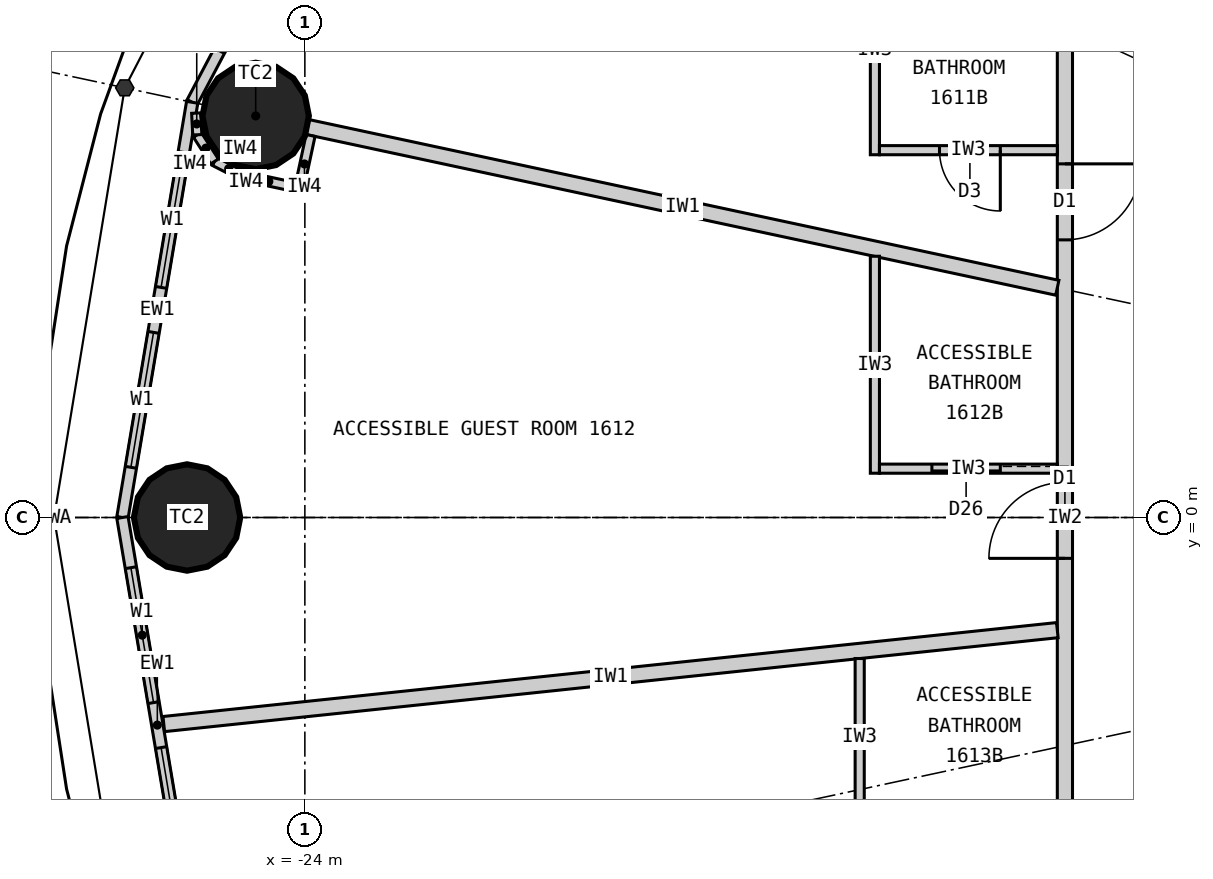
"""IFC4 building model, lengths in metres.
Left out: names, types, materials, properties, quantities, classifications, styles, units other than length and angle.
Written with IfcOpenShell. Run it as: python <this file> out.ifc"""

import sys

from ifc_helpers import new_model, si_unit, direction, frame, frame_2d, origin, origin_2d, place, context, subcontext, project, spatial, rectangle, circle, extrude, element, fill, save


model = new_model("IFC4")
c1 = context("Model", 3, precision=1e-05, world=origin(), true_north=direction((0.0, 1.0)))
c2 = subcontext(c1, "Body", "Model", "MODEL_VIEW")
j1 = project(units=[si_unit("LENGTHUNIT", "METRE"), si_unit("PLANEANGLEUNIT", "RADIAN")], contexts=[c1])
p1 = place(None, origin())
s1 = spatial("IfcSite", under=j1, at=p1, CompositionType="ELEMENT")
p2 = place(p1, origin())
s2 = spatial("IfcBuilding", under=s1, at=p2, CompositionType="ELEMENT")
p3 = place(p2, frame((0.0, 0.0, 67.2)))
s3 = spatial("IfcBuildingStorey", under=s2, at=p3, CompositionType="ELEMENT", Elevation=67.2)
for number, where, z_axis, x_axis in (
    (1, (-24.647, 5.283, 0.0), (0.0, 0.0, 1.0), (1.0, 0.0, 0.0)),
    (2, (-25.55, 0.0, 0.0), (0.0, 0.0, 1.0), (1.0, 0.0, 0.0)),
):
    element("IfcColumn", number, at=place(p3, frame(where, z_axis=z_axis, x_axis=x_axis)), inside=s3, PredefinedType="COLUMN", context=c2, shape_type="SweptSolid", body=[
        extrude(circle(Radius=0.7, at=origin_2d()), origin(), (0.0, 0.0, 1.0), 3.3),
    ])
p4 = place(p3, frame((-22.803, 10.532, 0.0), z_axis=(0.0, 0.0, 1.0), x_axis=(-0.467296867008, -0.884100468321, 0.0)))
e3 = element("IfcWall", 3, at=p4, inside=s3, PredefinedType="ELEMENTEDWALL", context=c2, shape_type="SweptSolid", body=[
    extrude(rectangle(XDim=5.734, YDim=0.15, at=frame_2d((2.867, 0.0))), origin(), (0.0, 0.0, 1.0), 3.12),
])
p5 = place(p4, frame((0.767, 0.0, 0.9)))
e4 = element("IfcOpeningElement", 4, at=p5, cuts=e3, PredefinedType="OPENING", context=c2, shape_type="SweptSolid", body=[
    extrude(rectangle(XDim=1.8, YDim=1.9, at=frame_2d((0.9, 0.95))), frame((0.0, 0.085, 0.0), z_axis=(0.0, -1.0, 0.0), x_axis=(1.0, 0.0, 0.0)), (0.0, 0.0, 1.0), 0.17),
])
p6 = place(p4, frame((3.167, 0.0, 0.9)))
e5 = element("IfcOpeningElement", 5, at=p6, cuts=e3, PredefinedType="OPENING", context=c2, shape_type="SweptSolid", body=[
    extrude(rectangle(XDim=1.8, YDim=1.9, at=frame_2d((0.9, 0.95))), frame((0.0, 0.085, 0.0), z_axis=(0.0, -1.0, 0.0), x_axis=(1.0, 0.0, 0.0)), (0.0, 0.0, 1.0), 0.17),
])
p7 = place(p3, frame((-25.482, 5.462, 0.0), z_axis=(0.0, 0.0, 1.0), x_axis=(-0.165642551694, -0.986185857264, 0.0)))
e6 = element("IfcWall", 6, at=p7, inside=s3, PredefinedType="ELEMENTEDWALL", context=c2, shape_type="SweptSolid", body=[
    extrude(rectangle(XDim=5.539, YDim=0.15, at=frame_2d((2.77, 0.0))), origin(), (0.0, 0.0, 1.0), 3.12),
])
p8 = place(p7, frame((0.669, 0.0, 0.9)))
e7 = element("IfcOpeningElement", 7, at=p8, cuts=e6, PredefinedType="OPENING", context=c2, shape_type="SweptSolid", body=[
    extrude(rectangle(XDim=1.8, YDim=1.9, at=frame_2d((0.9, 0.95))), frame((0.0, 0.085, 0.0), z_axis=(0.0, -1.0, 0.0), x_axis=(1.0, 0.0, 0.0)), (0.0, 0.0, 1.0), 0.17),
])
p9 = place(p7, frame((3.07, 0.0, 0.9)))
e8 = element("IfcOpeningElement", 8, at=p9, cuts=e6, PredefinedType="OPENING", context=c2, shape_type="SweptSolid", body=[
    extrude(rectangle(XDim=1.8, YDim=1.9, at=frame_2d((0.9, 0.95))), frame((0.0, 0.085, 0.0), z_axis=(0.0, -1.0, 0.0), x_axis=(1.0, 0.0, 0.0)), (0.0, 0.0, 1.0), 0.17),
])
p10 = place(p3, frame((-26.4, 0.0, 0.0), z_axis=(0.0, 0.0, 1.0), x_axis=(0.165642551694, -0.986185857264, 0.0)))
e9 = element("IfcWall", 9, at=p10, inside=s3, PredefinedType="ELEMENTEDWALL", context=c2, shape_type="SweptSolid", body=[
    extrude(rectangle(XDim=5.539, YDim=0.15, at=frame_2d((2.77, 0.0))), origin(), (0.0, 0.0, 1.0), 3.12),
])
p11 = place(p10, frame((0.669, 0.0, 0.9)))
e10 = element("IfcOpeningElement", 10, at=p11, cuts=e9, PredefinedType="OPENING", context=c2, shape_type="SweptSolid", body=[
    extrude(rectangle(XDim=1.8, YDim=1.9, at=frame_2d((0.9, 0.95))), frame((0.0, 0.085, 0.0), z_axis=(0.0, -1.0, 0.0), x_axis=(1.0, 0.0, 0.0)), (0.0, 0.0, 1.0), 0.17),
])
p12 = place(p10, frame((3.07, 0.0, 0.9)))
e11 = element("IfcOpeningElement", 11, at=p12, cuts=e9, PredefinedType="OPENING", context=c2, shape_type="SweptSolid", body=[
    extrude(rectangle(XDim=1.8, YDim=1.9, at=frame_2d((0.9, 0.95))), frame((0.0, 0.085, 0.0), z_axis=(0.0, -1.0, 0.0), x_axis=(1.0, 0.0, 0.0)), (0.0, 0.0, 1.0), 0.17),
])
p13 = place(p3, frame((-14.0, 9.9, 0.0), z_axis=(0.0, 0.0, 1.0), x_axis=(0.0, -1.0, 0.0)))
e12 = element("IfcWall", 12, at=p13, inside=s3, PredefinedType="PARTITIONING", context=c2, shape_type="SweptSolid", body=[
    extrude(rectangle(XDim=19.8, YDim=0.2, at=frame_2d((9.9, 0.0))), origin(), (0.0, 0.0, 1.0), 3.12),
])
p14 = place(p13, frame((0.103, 0.0, 0.0)))
e13 = element("IfcOpeningElement", 13, at=p14, cuts=e12, PredefinedType="OPENING", context=c2, shape_type="SweptSolid", body=[
    extrude(rectangle(XDim=1.0, YDim=2.2, at=frame_2d((0.5, 1.1))), frame((0.0, 0.11, 0.0), z_axis=(0.0, -1.0, 0.0), x_axis=(1.0, 0.0, 0.0)), (0.0, 0.0, 1.0), 0.22),
])
p15 = place(p13, frame((5.248, 0.0, 0.0)))
e14 = element("IfcOpeningElement", 14, at=p15, cuts=e12, PredefinedType="OPENING", context=c2, shape_type="SweptSolid", body=[
    extrude(rectangle(XDim=1.0, YDim=2.2, at=frame_2d((0.5, 1.1))), frame((0.0, 0.11, 0.0), z_axis=(0.0, -1.0, 0.0), x_axis=(1.0, 0.0, 0.0)), (0.0, 0.0, 1.0), 0.22),
])
p16 = place(p13, frame((9.438, 0.0, 0.0)))
e15 = element("IfcOpeningElement", 15, at=p16, cuts=e12, PredefinedType="OPENING", context=c2, shape_type="SweptSolid", body=[
    extrude(rectangle(XDim=1.0, YDim=2.2, at=frame_2d((0.5, 1.1))), frame((0.0, 0.11, 0.0), z_axis=(0.0, -1.0, 0.0), x_axis=(1.0, 0.0, 0.0)), (0.0, 0.0, 1.0), 0.22),
])
p17 = place(p13, frame((13.942, 0.0, 0.0)))
e16 = element("IfcOpeningElement", 16, at=p17, cuts=e12, PredefinedType="OPENING", context=c2, shape_type="SweptSolid", body=[
    extrude(rectangle(XDim=1.0, YDim=2.2, at=frame_2d((0.5, 1.1))), frame((0.0, 0.11, 0.0), z_axis=(0.0, -1.0, 0.0), x_axis=(1.0, 0.0, 0.0)), (0.0, 0.0, 1.0), 0.22),
])
p18 = place(p13, frame((18.698, 0.0, 0.0)))
e17 = element("IfcOpeningElement", 17, at=p18, cuts=e12, PredefinedType="OPENING", context=c2, shape_type="SweptSolid", body=[
    extrude(rectangle(XDim=1.0, YDim=2.2, at=frame_2d((0.5, 1.1))), frame((0.0, 0.11, 0.0), z_axis=(0.0, -1.0, 0.0), x_axis=(1.0, 0.0, 0.0)), (0.0, 0.0, 1.0), 0.22),
])
p19 = place(p3, frame((-14.1, 3.022, 0.0), z_axis=(0.0, 0.0, 1.0), x_axis=(-0.977790014929, 0.209586943072, 0.0)))
e18 = element("IfcWall", 18, at=p19, inside=s3, PredefinedType="PARTITIONING", context=c2, shape_type="SweptSolid", body=[
    extrude(rectangle(XDim=10.087, YDim=0.2, at=frame_2d((5.043, 0.0))), origin(), (0.0, 0.0, 1.0), 2.32),
])
p20 = place(p3, frame((-14.1, -1.482, 0.0), z_axis=(0.0, 0.0, 1.0), x_axis=(-0.994522076235, -0.104526742422, 0.0)))
e19 = element("IfcWall", 19, at=p20, inside=s3, PredefinedType="PARTITIONING", context=c2, shape_type="SweptSolid", body=[
    extrude(rectangle(XDim=11.821, YDim=0.2, at=frame_2d((5.91, 0.0))), origin(), (0.0, 0.0, 1.0), 2.32),
])
p21 = place(p3, frame((-16.5, 7.521, 0.0), z_axis=(0.0, 0.0, 1.0), x_axis=(0.0, -1.0, 0.0)))
e20 = element("IfcWall", 20, at=p21, inside=s3, PredefinedType="PARTITIONING", context=c2, shape_type="SweptSolid", body=[
    extrude(rectangle(XDim=2.749, YDim=0.12, at=frame_2d((1.374, 0.0))), origin(), (0.0, 0.0, 1.0), 3.12),
])
p22 = place(p3, frame((-14.1, 4.833, 0.0), z_axis=(0.0, 0.0, 1.0), x_axis=(-1.0, 0.0, 0.0)))
e21 = element("IfcWall", 21, at=p22, inside=s3, PredefinedType="PARTITIONING", context=c2, shape_type="SweptSolid", body=[
    extrude(rectangle(XDim=2.34, YDim=0.12, at=frame_2d((1.17, 0.0))), origin(), (0.0, 0.0, 1.0), 3.12),
])
p23 = place(p22, frame((0.75, 0.0, 0.0)))
e22 = element("IfcOpeningElement", 22, at=p23, cuts=e21, PredefinedType="OPENING", context=c2, shape_type="SweptSolid", body=[
    extrude(rectangle(XDim=0.8, YDim=2.1, at=frame_2d((0.4, 1.05))), frame((0.0, 0.07, 0.0), z_axis=(0.0, -1.0, 0.0), x_axis=(1.0, 0.0, 0.0)), (0.0, 0.0, 1.0), 0.14),
])
p24 = place(p3, frame((-16.5, 3.437, 0.0), z_axis=(0.0, 0.0, 1.0), x_axis=(0.0, -1.0, 0.0)))
e23 = element("IfcWall", 23, at=p24, inside=s3, PredefinedType="PARTITIONING", context=c2, shape_type="SweptSolid", body=[
    extrude(rectangle(XDim=2.854, YDim=0.12, at=frame_2d((1.427, 0.0))), origin(), (0.0, 0.0, 1.0), 3.12),
])
p25 = place(p3, frame((-14.1, 0.643, 0.0), z_axis=(0.0, 0.0, 1.0), x_axis=(-1.0, 0.0, 0.0)))
e24 = element("IfcWall", 24, at=p25, inside=s3, PredefinedType="PARTITIONING", context=c2, shape_type="SweptSolid", body=[
    extrude(rectangle(XDim=2.34, YDim=0.12, at=frame_2d((1.17, 0.0))), origin(), (0.0, 0.0, 1.0), 3.12),
])
p26 = place(p25, frame((0.75, 0.0, 0.0)))
e25 = element("IfcOpeningElement", 25, at=p26, cuts=e24, PredefinedType="OPENING", context=c2, shape_type="SweptSolid", body=[
    extrude(rectangle(XDim=0.9, YDim=2.1, at=frame_2d((0.45, 1.05))), frame((0.0, 0.07, 0.0), z_axis=(0.0, -1.0, 0.0), x_axis=(1.0, 0.0, 0.0)), (0.0, 0.0, 1.0), 0.14),
])
p27 = place(p3, frame((-16.7, -1.855, 0.0), z_axis=(0.0, 0.0, 1.0), x_axis=(0.0, -1.0, 0.0)))
e26 = element("IfcWall", 26, at=p27, inside=s3, PredefinedType="PARTITIONING", context=c2, shape_type="SweptSolid", body=[
    extrude(rectangle(XDim=2.067, YDim=0.12, at=frame_2d((1.033, 0.0))), origin(), (0.0, 0.0, 1.0), 3.12),
])
p28 = place(p3, frame((-23.925, 5.026, 0.0), z_axis=(0.0, 0.0, 1.0), x_axis=(-0.209681192172, -0.977769808109, 0.0)))
e27 = element("IfcWall", 27, at=p28, inside=s3, PredefinedType="PARTITIONING", context=c2, shape_type="SweptSolid", body=[
    extrude(rectangle(XDim=0.767, YDim=0.12, at=frame_2d((0.384, 0.0))), origin(), (0.0, 0.0, 1.0), 3.12),
])
p29 = place(p3, frame((-24.132, 4.347, 0.0), z_axis=(0.0, 0.0, 1.0), x_axis=(-0.977776882509, 0.209648200638, 0.0)))
e28 = element("IfcWall", 28, at=p29, inside=s3, PredefinedType="PARTITIONING", context=c2, shape_type="SweptSolid", body=[
    extrude(rectangle(XDim=0.7, YDim=0.12, at=frame_2d((0.35, 0.0))), origin(), (0.0, 0.0, 1.0), 3.12),
])
for number, where, z_axis, x_axis in (
    (29, (-24.816, 4.494, 0.0), (0.0, 0.0, 1.0), (-0.89, 0.455, 0.0)),
    (30, (-25.188, 4.684, 0.0), (0.0, 0.0, 1.0), (-0.543, 0.84, 0.0)),
):
    element("IfcWall", number, at=place(p3, frame(where, z_axis=z_axis, x_axis=x_axis)), inside=s3, PredefinedType="PARTITIONING", context=c2, shape_type="SweptSolid", body=[
        extrude(rectangle(XDim=0.418, YDim=0.12, at=frame_2d((0.209, 0.0))), origin(), (0.0, 0.0, 1.0), 3.12),
    ])
p30 = place(p3, frame((-25.416, 5.035, 0.0), z_axis=(0.0, 0.0, 1.0), x_axis=(-0.050406329159, 0.998728793007, 0.0)))
e31 = element("IfcWall", 31, at=p30, inside=s3, PredefinedType="PARTITIONING", context=c2, shape_type="SweptSolid", body=[
    extrude(rectangle(XDim=0.286, YDim=0.12, at=frame_2d((0.143, 0.0))), origin(), (0.0, 0.0, 1.0), 3.12),
])
p31 = place(p8, origin())
e32 = element("IfcWindow", 32, at=p31, inside=s3, PartitioningType="SINGLE_PANEL", PredefinedType="WINDOW", context=c2, shape_type="SweptSolid", body=[
    extrude(rectangle(XDim=1.8, YDim=1.9, at=frame_2d((0.9, 0.95))), frame((0.0, 0.03, 0.0), z_axis=(0.0, -1.0, 0.0), x_axis=(1.0, 0.0, 0.0)), (0.0, 0.0, 1.0), 0.06),
])
fill(e7, e32)
p32 = place(p9, origin())
e33 = element("IfcWindow", 33, at=p32, inside=s3, PartitioningType="SINGLE_PANEL", PredefinedType="WINDOW", context=c2, shape_type="SweptSolid", body=[
    extrude(rectangle(XDim=1.8, YDim=1.9, at=frame_2d((0.9, 0.95))), frame((0.0, 0.03, 0.0), z_axis=(0.0, -1.0, 0.0), x_axis=(1.0, 0.0, 0.0)), (0.0, 0.0, 1.0), 0.06),
])
fill(e8, e33)
p33 = place(p11, origin())
e34 = element("IfcWindow", 34, at=p33, inside=s3, PartitioningType="SINGLE_PANEL", PredefinedType="WINDOW", context=c2, shape_type="SweptSolid", body=[
    extrude(rectangle(XDim=1.8, YDim=1.9, at=frame_2d((0.9, 0.95))), frame((0.0, 0.03, 0.0), z_axis=(0.0, -1.0, 0.0), x_axis=(1.0, 0.0, 0.0)), (0.0, 0.0, 1.0), 0.06),
])
fill(e10, e34)
p34 = place(p12, origin())
e35 = element("IfcWindow", 35, at=p34, inside=s3, PartitioningType="SINGLE_PANEL", PredefinedType="WINDOW", context=c2, shape_type="SweptSolid", body=[
    extrude(rectangle(XDim=1.8, YDim=1.9, at=frame_2d((0.9, 0.95))), frame((0.0, 0.03, 0.0), z_axis=(0.0, -1.0, 0.0), x_axis=(1.0, 0.0, 0.0)), (0.0, 0.0, 1.0), 0.06),
])
fill(e11, e35)
p35 = place(p23, origin())
e36 = element("IfcDoor", 36, at=p35, inside=s3, OperationType="SINGLE_SWING_LEFT", PredefinedType="DOOR", context=c2, shape_type="SweptSolid", body=[
    extrude(rectangle(XDim=0.8, YDim=2.1, at=frame_2d((0.4, 1.05))), frame((0.0, 0.025, 0.0), z_axis=(0.0, -1.0, 0.0), x_axis=(1.0, 0.0, 0.0)), (0.0, 0.0, 1.0), 0.05),
])
fill(e22, e36)
p36 = place(p15, origin())
e37 = element("IfcDoor", 37, at=p36, inside=s3, OperationType="SINGLE_SWING_LEFT", PredefinedType="DOOR", context=c2, shape_type="SweptSolid", body=[
    extrude(rectangle(XDim=1.0, YDim=2.2, at=frame_2d((0.5, 1.1))), frame((0.0, 0.025, 0.0), z_axis=(0.0, -1.0, 0.0), x_axis=(1.0, 0.0, 0.0)), (0.0, 0.0, 1.0), 0.05),
])
fill(e14, e37)
p37 = place(p26, origin())
e38 = element("IfcDoor", 38, at=p37, inside=s3, OperationType="SLIDING_TO_LEFT", PredefinedType="DOOR", context=c2, shape_type="SweptSolid", body=[
    extrude(rectangle(XDim=0.9, YDim=2.1, at=frame_2d((0.45, 1.05))), frame((0.0, 0.025, 0.0), z_axis=(0.0, -1.0, 0.0), x_axis=(1.0, 0.0, 0.0)), (0.0, 0.0, 1.0), 0.05),
])
fill(e25, e38)
p38 = place(p16, origin())
e39 = element("IfcDoor", 39, at=p38, inside=s3, OperationType="SINGLE_SWING_RIGHT", PredefinedType="DOOR", context=c2, shape_type="SweptSolid", body=[
    extrude(rectangle(XDim=1.0, YDim=2.2, at=frame_2d((0.5, 1.1))), frame((0.0, 0.025, 0.0), z_axis=(0.0, -1.0, 0.0), x_axis=(1.0, 0.0, 0.0)), (0.0, 0.0, 1.0), 0.05),
])
fill(e15, e39)
save(model, sys.argv[1])
